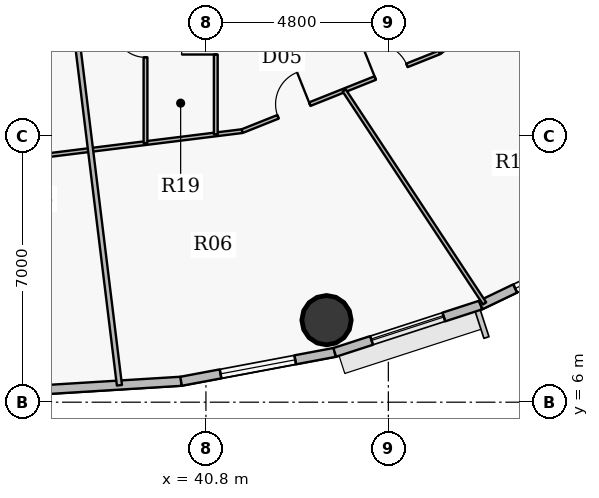
"""IFC4 building model, lengths in metres.
Left out: names, types, materials, properties, quantities, classifications, styles, units other than length and angle.
Written with IfcOpenShell. Run it as: python <this file> out.ifc"""

import sys

from ifc_helpers import new_model, si_unit, direction, frame, frame_2d, origin, origin_2d, place, context, subcontext, project, spatial, rectangle, hollow_circle, extrude, source, transform, mapped, element, fill, save


model = new_model("IFC4")
c1 = context("Model", 3, precision=1e-05, world=origin(), true_north=direction((0.0, 1.0)))
c2 = subcontext(c1, "Body", "Model", "MODEL_VIEW")
j1 = project(units=[si_unit("LENGTHUNIT", "METRE"), si_unit("PLANEANGLEUNIT", "RADIAN")], contexts=[c1])
p1 = place(None, origin())
s1 = spatial("IfcSite", under=j1, at=p1, CompositionType="ELEMENT")
p2 = place(p1, origin())
s2 = spatial("IfcBuilding", under=s1, at=p2, CompositionType="ELEMENT")
p3 = place(p2, frame((0.0, 0.0, 167.4)))
s3 = spatial("IfcBuildingStorey", under=s2, at=p3, CompositionType="ELEMENT", Elevation=167.4)
p4 = place(p3, frame((43.973, 8.159, 0.0), z_axis=(0.0, 0.0, 1.0), x_axis=(1.0, 0.0, 0.0)))
e1 = element("IfcColumn", 1, at=p4, inside=s3, PredefinedType="COLUMN", context=c2, shape_type="SweptSolid", body=[
    extrude(hollow_circle(Radius=0.65, WallThickness=0.04, at=origin_2d()), origin(), (0.0, 0.0, 1.0), 3.75),
])
p5 = place(p3, frame((40.146, 6.551, 0.0), z_axis=(0.0, 0.0, 1.0), x_axis=(-0.998104600619, -0.061540281305, 0.0)))
e2 = element("IfcWall", 2, at=p5, inside=s3, PredefinedType="SOLIDWALL", context=c2, shape_type="SweptSolid", body=[
    extrude(rectangle(XDim=4.154, YDim=0.24, at=frame_2d((2.077, 0.0))), origin(), (0.0, 0.0, 1.0), 3.5),
])
p6 = place(p3, frame((44.189, 7.311, 0.0), z_axis=(0.0, 0.0, 1.0), x_axis=(-0.982788108205, -0.184736391573, 0.0)))
e3 = element("IfcWall", 3, at=p6, inside=s3, PredefinedType="SOLIDWALL", context=c2, shape_type="SweptSolid", body=[
    extrude(rectangle(XDim=4.114, YDim=0.24, at=frame_2d((2.057, 0.0))), origin(), (0.0, 0.0, 1.0), 3.5),
])
p7 = place(p6, frame((1.057, 0.0, 0.9)))
e4 = element("IfcOpeningElement", 4, at=p7, cuts=e3, PredefinedType="OPENING", context=c2, shape_type="SweptSolid", body=[
    extrude(rectangle(XDim=2.0, YDim=1.75, at=origin_2d()), frame((1.0, 0.13, 0.875), z_axis=(0.0, -1.0, 0.0), x_axis=(1.0, 0.0, 0.0)), (0.0, 0.0, 1.0), 0.26),
])
p8 = place(p3, frame((48.03, 8.556, 0.0), z_axis=(0.0, 0.0, 1.0), x_axis=(-0.951209870236, -0.30854462038, 0.0)))
e5 = element("IfcWall", 5, at=p8, inside=s3, PredefinedType="SOLIDWALL", context=c2, shape_type="SweptSolid", body=[
    extrude(rectangle(XDim=4.038, YDim=0.24, at=frame_2d((2.019, 0.0))), origin(), (0.0, 0.0, 1.0), 3.5),
])
p9 = place(p8, frame((1.019, 0.0, 0.9)))
e6 = element("IfcOpeningElement", 6, at=p9, cuts=e5, PredefinedType="OPENING", context=c2, shape_type="SweptSolid", body=[
    extrude(rectangle(XDim=2.0, YDim=1.75, at=origin_2d()), frame((1.0, 0.13, 0.875), z_axis=(0.0, -1.0, 0.0), x_axis=(1.0, 0.0, 0.0)), (0.0, 0.0, 1.0), 0.26),
])
p10 = place(p3, frame((51.573, 10.257, 0.0), z_axis=(0.0, 0.0, 1.0), x_axis=(-0.901564733809, -0.432644231155, 0.0)))
e7 = element("IfcWall", 7, at=p10, inside=s3, PredefinedType="SOLIDWALL", context=c2, shape_type="SweptSolid", body=[
    extrude(rectangle(XDim=3.93, YDim=0.24, at=frame_2d((1.965, 0.0))), origin(), (0.0, 0.0, 1.0), 3.5),
])
p11 = place(p10, frame((0.923, 0.0, 0.9)))
e8 = element("IfcOpeningElement", 8, at=p11, cuts=e7, PredefinedType="OPENING", context=c2, shape_type="SweptSolid", body=[
    extrude(rectangle(XDim=2.0, YDim=1.75, at=origin_2d()), frame((1.0, 0.13, 0.875), z_axis=(0.0, -1.0, 0.0), x_axis=(1.0, 0.0, 0.0)), (0.0, 0.0, 1.0), 0.26),
])
p12 = place(p3, frame((36.0, 12.419, 0.0), z_axis=(0.0, 0.0, 1.0), x_axis=(0.992396615981, 0.123081097612, 0.0)))
e9 = element("IfcWall", 9, at=p12, inside=s3, PredefinedType="PARTITIONING", context=c2, shape_type="SweptSolid", body=[
    extrude(rectangle(XDim=5.798, YDim=0.1, at=frame_2d((2.899, 0.0))), origin(), (0.0, 0.0, 1.0), 2.935),
])
p13 = place(p3, frame((37.108, 17.972, 0.0), z_axis=(0.0, 0.0, 1.0), x_axis=(0.121868774407, -0.992546221505, 0.0)))
e10 = element("IfcWall", 10, at=p13, inside=s3, PredefinedType="PARTITIONING", context=c2, shape_type="SweptSolid", body=[
    extrude(rectangle(XDim=11.613, YDim=0.135, at=frame_2d((5.807, 0.0))), origin(), (0.0, 0.0, 1.0), 2.935),
])
p14 = place(p3, frame((39.21, 12.817, 0.0), z_axis=(0.0, 0.0, 1.0), x_axis=(0.0, 1.0, 0.0)))
e11 = element("IfcWall", 11, at=p14, inside=s3, PredefinedType="PARTITIONING", context=c2, shape_type="SweptSolid", body=[
    extrude(rectangle(XDim=5.333, YDim=0.1, at=frame_2d((2.667, 0.0))), origin(), (0.0, 0.0, 1.0), 3.125),
])
p15 = place(p14, frame((2.256, 0.0, 0.0)))
e12 = element("IfcOpeningElement", 12, at=p15, cuts=e11, PredefinedType="OPENING", context=c2, shape_type="SweptSolid", body=[
    extrude(rectangle(XDim=0.82, YDim=2.1, at=origin_2d()), frame((0.41, 0.06, 1.05), z_axis=(0.0, -1.0, 0.0), x_axis=(1.0, 0.0, 0.0)), (0.0, 0.0, 1.0), 0.12),
])
p16 = place(p3, frame((41.059, 13.046, 0.0), z_axis=(0.0, 0.0, 1.0), x_axis=(0.0, 1.0, 0.0)))
e13 = element("IfcWall", 13, at=p16, inside=s3, PredefinedType="PARTITIONING", context=c2, shape_type="SweptSolid", body=[
    extrude(rectangle(XDim=5.104, YDim=0.1, at=frame_2d((2.552, 0.0))), origin(), (0.0, 0.0, 1.0), 2.935),
])
p17 = place(p16, frame((2.102, 0.0, 0.0)))
e14 = element("IfcOpeningElement", 14, at=p17, cuts=e13, PredefinedType="OPENING", context=c2, shape_type="SweptSolid", body=[
    extrude(rectangle(XDim=0.9, YDim=2.1, at=origin_2d()), frame((0.45, 0.06, 1.05), z_axis=(0.0, -1.0, 0.0), x_axis=(1.0, 0.0, 0.0)), (0.0, 0.0, 1.0), 0.12),
])
p18 = place(p3, frame((41.754, 13.133, 0.0), z_axis=(0.0, 0.0, 1.0), x_axis=(0.928798710424, 0.370584613166, 0.0)))
e15 = element("IfcWall", 15, at=p18, inside=s3, PredefinedType="PARTITIONING", context=c2, shape_type="SweptSolid", body=[
    extrude(rectangle(XDim=5.589, YDim=0.1, at=frame_2d((2.794, 0.0))), origin(), (0.0, 0.0, 1.0), 2.935),
])
p19 = place(p18, frame((1.015, 0.0, 0.0)))
e16 = element("IfcOpeningElement", 16, at=p19, cuts=e15, PredefinedType="OPENING", context=c2, shape_type="SweptSolid", body=[
    extrude(rectangle(XDim=0.9, YDim=2.1, at=origin_2d()), frame((0.45, 0.06, 1.05), z_axis=(0.0, -1.0, 0.0), x_axis=(1.0, 0.0, 0.0)), (0.0, 0.0, 1.0), 0.12),
])
p20 = place(p18, frame((3.769, 0.0, 0.0)))
e17 = element("IfcOpeningElement", 17, at=p20, cuts=e15, PredefinedType="OPENING", context=c2, shape_type="SweptSolid", body=[
    extrude(rectangle(XDim=0.9, YDim=2.1, at=origin_2d()), frame((0.45, 0.06, 1.05), z_axis=(0.0, -1.0, 0.0), x_axis=(1.0, 0.0, 0.0)), (0.0, 0.0, 1.0), 0.12),
])
p21 = place(p3, frame((44.438, 14.204, 0.0), z_axis=(0.0, 0.0, 1.0), x_axis=(0.550479331571, -0.834848792006, 0.0)))
e18 = element("IfcWall", 18, at=p21, inside=s3, PredefinedType="PARTITIONING", context=c2, shape_type="SweptSolid", body=[
    extrude(rectangle(XDim=6.712, YDim=0.1, at=frame_2d((3.356, 0.0))), origin(), (0.0, 0.0, 1.0), 2.935),
])
p22 = place(p3, frame((46.945, 15.204, 0.0), z_axis=(0.0, 0.0, 1.0), x_axis=(0.787300155222, 0.616569919463, 0.0)))
e19 = element("IfcWall", 19, at=p22, inside=s3, PredefinedType="PARTITIONING", context=c2, shape_type="SweptSolid", body=[
    extrude(rectangle(XDim=5.232, YDim=0.1, at=frame_2d((2.616, 0.0))), origin(), (0.0, 0.0, 1.0), 2.935),
])
p23 = place(p22, frame((3.018, 0.0, 0.0)))
e20 = element("IfcOpeningElement", 20, at=p23, cuts=e19, PredefinedType="OPENING", context=c2, shape_type="SweptSolid", body=[
    extrude(rectangle(XDim=0.9, YDim=2.1, at=origin_2d()), frame((0.45, 0.06, 1.05), z_axis=(0.0, -1.0, 0.0), x_axis=(1.0, 0.0, 0.0)), (0.0, 0.0, 1.0), 0.12),
])
p24 = place(p3, frame((48.43, 16.367, 0.0), z_axis=(0.0, 0.0, 1.0), x_axis=(0.759902290403, -0.650037313575, 0.0)))
e21 = element("IfcWall", 21, at=p24, inside=s3, PredefinedType="PARTITIONING", context=c2, shape_type="SweptSolid", body=[
    extrude(rectangle(XDim=7.095, YDim=0.1, at=frame_2d((3.548, 0.0))), origin(), (0.0, 0.0, 1.0), 2.935),
])
m1 = source(origin(), c2, "Body", "SweptSolid", [
    extrude(rectangle(XDim=2.0, YDim=1.75, at=origin_2d()), frame((1.0, 0.03, 0.875), z_axis=(0.0, -1.0, 0.0), x_axis=(1.0, 0.0, 0.0)), (0.0, 0.0, 1.0), 0.06),
])
p25 = place(p7, origin())
e22 = element("IfcWindow", 22, at=p25, inside=s3, PartitioningType="DOUBLE_PANEL_VERTICAL", PredefinedType="WINDOW", context=c2, shape_type="MappedRepresentation", body=[
    mapped(m1, transform((0.0, 0.0, 0.0), x_axis=(1.0, 0.0, 0.0), y_axis=(0.0, 1.0, 0.0), z_axis=(0.0, 0.0, 1.0), scale=1.0)),
])
fill(e4, e22)
p26 = place(p9, origin())
e23 = element("IfcWindow", 23, at=p26, inside=s3, PartitioningType="DOUBLE_PANEL_VERTICAL", PredefinedType="WINDOW", context=c2, shape_type="MappedRepresentation", body=[
    mapped(m1, transform((0.0, 0.0, 0.0), x_axis=(1.0, 0.0, 0.0), y_axis=(0.0, 1.0, 0.0), z_axis=(0.0, 0.0, 1.0), scale=1.0)),
])
fill(e6, e23)
p27 = place(p11, origin())
e24 = element("IfcWindow", 24, at=p27, inside=s3, PartitioningType="DOUBLE_PANEL_VERTICAL", PredefinedType="WINDOW", context=c2, shape_type="MappedRepresentation", body=[
    mapped(m1, transform((0.0, 0.0, 0.0), x_axis=(1.0, 0.0, 0.0), y_axis=(0.0, 1.0, 0.0), z_axis=(0.0, 0.0, 1.0), scale=1.0)),
])
fill(e8, e24)
m2 = source(origin(), c2, "Body", "SweptSolid", [
    extrude(rectangle(XDim=0.9, YDim=2.1, at=origin_2d()), frame((0.45, 0.025, 1.05), z_axis=(0.0, -1.0, 0.0), x_axis=(1.0, 0.0, 0.0)), (0.0, 0.0, 1.0), 0.05),
])
p28 = place(p19, origin())
e25 = element("IfcDoor", 25, at=p28, inside=s3, OperationType="SINGLE_SWING_RIGHT", PredefinedType="DOOR", context=c2, shape_type="MappedRepresentation", body=[
    mapped(m2, transform((0.0, 0.0, 0.0), x_axis=(1.0, 0.0, 0.0), y_axis=(0.0, 1.0, 0.0), z_axis=(0.0, 0.0, 1.0), scale=1.0)),
])
fill(e16, e25)
p29 = place(p20, origin())
e26 = element("IfcDoor", 26, at=p29, inside=s3, OperationType="SINGLE_SWING_LEFT", PredefinedType="DOOR", context=c2, shape_type="MappedRepresentation", body=[
    mapped(m2, transform((0.0, 0.0, 0.0), x_axis=(1.0, 0.0, 0.0), y_axis=(0.0, 1.0, 0.0), z_axis=(0.0, 0.0, 1.0), scale=1.0)),
])
fill(e17, e26)
p30 = place(p17, origin())
e27 = element("IfcDoor", 27, at=p30, inside=s3, OperationType="SINGLE_SWING_LEFT", PredefinedType="DOOR", context=c2, shape_type="MappedRepresentation", body=[
    mapped(m2, transform((0.0, 0.0, 0.0), x_axis=(1.0, 0.0, 0.0), y_axis=(0.0, 1.0, 0.0), z_axis=(0.0, 0.0, 1.0), scale=1.0)),
])
fill(e14, e27)
m3 = source(origin(), c2, "Body", "SweptSolid", [
    extrude(rectangle(XDim=0.82, YDim=2.1, at=origin_2d()), frame((0.41, 0.025, 1.05), z_axis=(0.0, -1.0, 0.0), x_axis=(1.0, 0.0, 0.0)), (0.0, 0.0, 1.0), 0.05),
])
p31 = place(p15, origin())
e28 = element("IfcDoor", 28, at=p31, inside=s3, OperationType="SINGLE_SWING_RIGHT", PredefinedType="DOOR", context=c2, shape_type="MappedRepresentation", body=[
    mapped(m3, transform((0.0, 0.0, 0.0), x_axis=(1.0, 0.0, 0.0), y_axis=(0.0, 1.0, 0.0), z_axis=(0.0, 0.0, 1.0), scale=1.0)),
])
fill(e12, e28)
save(model, sys.argv[1])
